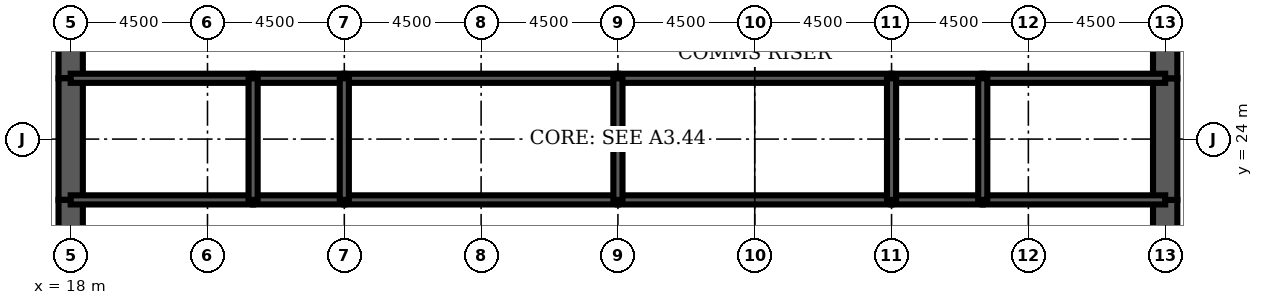
"""IFC4 building model, lengths in metres.
Left out: names, types, materials, properties, quantities, classifications, styles, units other than length and angle.
Written with IfcOpenShell. Run it as: python <this file> out.ifc"""

import sys

from ifc_helpers import new_model, si_unit, direction, frame, frame_2d, origin, place, context, subcontext, project, spatial, rectangle, extrude, element, fill, save


model = new_model("IFC4")
c1 = context("Model", 3, precision=1e-05, world=origin(), true_north=direction((0.0, 1.0)))
c2 = subcontext(c1, "Body", "Model", "MODEL_VIEW")
j1 = project(units=[si_unit("LENGTHUNIT", "METRE"), si_unit("PLANEANGLEUNIT", "RADIAN")], contexts=[c1])
p1 = place(None, origin())
s1 = spatial("IfcSite", under=j1, at=p1, CompositionType="ELEMENT")
p2 = place(p1, origin())
s2 = spatial("IfcBuilding", under=s1, at=p2, CompositionType="ELEMENT")
p3 = place(p2, frame((0.0, 0.0, 190.0)))
s3 = spatial("IfcBuildingStorey", under=s2, at=p3, CompositionType="ELEMENT", Elevation=190.0)
p4 = place(p3, frame((18.0, 28.8, 0.0), z_axis=(0.0, 0.0, 1.0), x_axis=(0.0, -1.0, 0.0)))
e1 = element("IfcWall", 1, at=p4, inside=s3, PredefinedType="SHEAR", context=c2, shape_type="SweptSolid", body=[
    extrude(rectangle(XDim=2.8, YDim=0.8, at=frame_2d((1.4, 0.0))), origin(), (0.0, 0.0, 1.0), 4.2),
])
p5 = place(p4, frame((0.4, 0.0, 0.0)))
e2 = element("IfcOpeningElement", 2, at=p5, cuts=e1, PredefinedType="OPENING", context=c2, shape_type="SweptSolid", body=[
    extrude(rectangle(XDim=1.8, YDim=2.1, at=frame_2d((0.9, 1.05))), frame((0.0, 0.41, 0.0), z_axis=(0.0, -1.0, 0.0), x_axis=(1.0, 0.0, 0.0)), (0.0, 0.0, 1.0), 0.82),
])
p6 = place(p3, frame((18.0, 26.0, 0.0), z_axis=(0.0, 0.0, 1.0), x_axis=(0.0, -1.0, 0.0)))
e3 = element("IfcWall", 3, at=p6, inside=s3, PredefinedType="SHEAR", context=c2, shape_type="SweptSolid", body=[
    extrude(rectangle(XDim=4.0, YDim=0.8, at=frame_2d((2.0, 0.0))), origin(), (0.0, 0.0, 1.0), 4.2),
])
p7 = place(p3, frame((18.0, 22.0, 0.0), z_axis=(0.0, 0.0, 1.0), x_axis=(0.0, -1.0, 0.0)))
e4 = element("IfcWall", 4, at=p7, inside=s3, PredefinedType="SHEAR", context=c2, shape_type="SweptSolid", body=[
    extrude(rectangle(XDim=2.8, YDim=0.8, at=frame_2d((1.4, 0.0))), origin(), (0.0, 0.0, 1.0), 4.2),
])
p8 = place(p7, frame((0.6, 0.0, 0.0)))
e5 = element("IfcOpeningElement", 5, at=p8, cuts=e4, PredefinedType="OPENING", context=c2, shape_type="SweptSolid", body=[
    extrude(rectangle(XDim=1.8, YDim=2.1, at=frame_2d((0.9, 1.05))), frame((0.0, 0.41, 0.0), z_axis=(0.0, -1.0, 0.0), x_axis=(1.0, 0.0, 0.0)), (0.0, 0.0, 1.0), 0.82),
])
p9 = place(p3, frame((54.0, 19.2, 0.0), z_axis=(0.0, 0.0, 1.0), x_axis=(0.0, 1.0, 0.0)))
e6 = element("IfcWall", 6, at=p9, inside=s3, PredefinedType="SHEAR", context=c2, shape_type="SweptSolid", body=[
    extrude(rectangle(XDim=2.8, YDim=0.8, at=frame_2d((1.4, 0.0))), origin(), (0.0, 0.0, 1.0), 4.2),
])
p10 = place(p9, frame((0.4, 0.0, 0.0)))
e7 = element("IfcOpeningElement", 7, at=p10, cuts=e6, PredefinedType="OPENING", context=c2, shape_type="SweptSolid", body=[
    extrude(rectangle(XDim=1.8, YDim=2.1, at=frame_2d((0.9, 1.05))), frame((0.0, 0.41, 0.0), z_axis=(0.0, -1.0, 0.0), x_axis=(1.0, 0.0, 0.0)), (0.0, 0.0, 1.0), 0.82),
])
p11 = place(p3, frame((54.0, 22.0, 0.0), z_axis=(0.0, 0.0, 1.0), x_axis=(0.0, 1.0, 0.0)))
e8 = element("IfcWall", 8, at=p11, inside=s3, PredefinedType="SHEAR", context=c2, shape_type="SweptSolid", body=[
    extrude(rectangle(XDim=4.0, YDim=0.8, at=frame_2d((2.0, 0.0))), origin(), (0.0, 0.0, 1.0), 4.2),
])
p12 = place(p3, frame((54.0, 26.0, 0.0), z_axis=(0.0, 0.0, 1.0), x_axis=(0.0, 1.0, 0.0)))
e9 = element("IfcWall", 9, at=p12, inside=s3, PredefinedType="SHEAR", context=c2, shape_type="SweptSolid", body=[
    extrude(rectangle(XDim=2.8, YDim=0.8, at=frame_2d((1.4, 0.0))), origin(), (0.0, 0.0, 1.0), 4.2),
])
p13 = place(p12, frame((0.6, 0.0, 0.0)))
e10 = element("IfcOpeningElement", 10, at=p13, cuts=e9, PredefinedType="OPENING", context=c2, shape_type="SweptSolid", body=[
    extrude(rectangle(XDim=1.8, YDim=2.1, at=frame_2d((0.9, 1.05))), frame((0.0, 0.41, 0.0), z_axis=(0.0, -1.0, 0.0), x_axis=(1.0, 0.0, 0.0)), (0.0, 0.0, 1.0), 0.82),
])
p14 = place(p3, frame((18.0, 22.0, 0.0), z_axis=(0.0, 0.0, 1.0), x_axis=(1.0, 0.0, 0.0)))
e11 = element("IfcWall", 11, at=p14, inside=s3, PredefinedType="SOLIDWALL", context=c2, shape_type="SweptSolid", body=[
    extrude(rectangle(XDim=6.0, YDim=0.3, at=frame_2d((3.0, 0.0))), origin(), (0.0, 0.0, 1.0), 4.2),
])
p15 = place(p14, frame((4.4, 0.0, 0.0)))
e12 = element("IfcOpeningElement", 12, at=p15, cuts=e11, PredefinedType="OPENING", context=c2, shape_type="SweptSolid", body=[
    extrude(rectangle(XDim=1.0, YDim=2.1, at=frame_2d((0.5, 1.05))), frame((0.0, 0.16, 0.0), z_axis=(0.0, -1.0, 0.0), x_axis=(1.0, 0.0, 0.0)), (0.0, 0.0, 1.0), 0.32),
])
p16 = place(p14, frame((0.8, 0.0, 0.0)))
e13 = element("IfcOpeningElement", 13, at=p16, cuts=e11, PredefinedType="OPENING", context=c2, shape_type="SweptSolid", body=[
    extrude(rectangle(XDim=1.0, YDim=2.1, at=frame_2d((0.5, 1.05))), frame((0.0, 0.16, 0.0), z_axis=(0.0, -1.0, 0.0), x_axis=(1.0, 0.0, 0.0)), (0.0, 0.0, 1.0), 0.32),
])
p17 = place(p3, frame((24.0, 22.0, 0.0), z_axis=(0.0, 0.0, 1.0), x_axis=(1.0, 0.0, 0.0)))
e14 = element("IfcWall", 14, at=p17, inside=s3, PredefinedType="SOLIDWALL", context=c2, shape_type="SweptSolid", body=[
    extrude(rectangle(XDim=3.0, YDim=0.3, at=frame_2d((1.5, 0.0))), origin(), (0.0, 0.0, 1.0), 4.2),
])
p18 = place(p17, frame((1.0, 0.0, 0.0)))
e15 = element("IfcOpeningElement", 15, at=p18, cuts=e14, PredefinedType="OPENING", context=c2, shape_type="SweptSolid", body=[
    extrude(rectangle(XDim=1.0, YDim=2.1, at=frame_2d((0.5, 1.05))), frame((0.0, 0.16, 0.0), z_axis=(0.0, -1.0, 0.0), x_axis=(1.0, 0.0, 0.0)), (0.0, 0.0, 1.0), 0.32),
])
p19 = place(p3, frame((27.0, 22.0, 0.0), z_axis=(0.0, 0.0, 1.0), x_axis=(1.0, 0.0, 0.0)))
e16 = element("IfcWall", 16, at=p19, inside=s3, PredefinedType="SOLIDWALL", context=c2, shape_type="SweptSolid", body=[
    extrude(rectangle(XDim=9.0, YDim=0.3, at=frame_2d((4.5, 0.0))), origin(), (0.0, 0.0, 1.0), 4.2),
])
p20 = place(p19, frame((4.0, 0.0, 0.0)))
e17 = element("IfcOpeningElement", 17, at=p20, cuts=e16, PredefinedType="OPENING", context=c2, shape_type="SweptSolid", body=[
    extrude(rectangle(XDim=1.0, YDim=2.1, at=frame_2d((0.5, 1.05))), frame((0.0, 0.16, 0.0), z_axis=(0.0, -1.0, 0.0), x_axis=(1.0, 0.0, 0.0)), (0.0, 0.0, 1.0), 0.32),
])
p21 = place(p3, frame((36.0, 22.0, 0.0), z_axis=(0.0, 0.0, 1.0), x_axis=(1.0, 0.0, 0.0)))
e18 = element("IfcWall", 18, at=p21, inside=s3, PredefinedType="SOLIDWALL", context=c2, shape_type="SweptSolid", body=[
    extrude(rectangle(XDim=9.0, YDim=0.3, at=frame_2d((4.5, 0.0))), origin(), (0.0, 0.0, 1.0), 4.2),
])
p22 = place(p21, frame((4.0, 0.0, 0.0)))
e19 = element("IfcOpeningElement", 19, at=p22, cuts=e18, PredefinedType="OPENING", context=c2, shape_type="SweptSolid", body=[
    extrude(rectangle(XDim=1.0, YDim=2.1, at=frame_2d((0.5, 1.05))), frame((0.0, 0.16, 0.0), z_axis=(0.0, -1.0, 0.0), x_axis=(1.0, 0.0, 0.0)), (0.0, 0.0, 1.0), 0.32),
])
p23 = place(p3, frame((45.0, 22.0, 0.0), z_axis=(0.0, 0.0, 1.0), x_axis=(1.0, 0.0, 0.0)))
e20 = element("IfcWall", 20, at=p23, inside=s3, PredefinedType="SOLIDWALL", context=c2, shape_type="SweptSolid", body=[
    extrude(rectangle(XDim=3.0, YDim=0.3, at=frame_2d((1.5, 0.0))), origin(), (0.0, 0.0, 1.0), 4.2),
])
p24 = place(p23, frame((1.0, 0.0, 0.0)))
e21 = element("IfcOpeningElement", 21, at=p24, cuts=e20, PredefinedType="OPENING", context=c2, shape_type="SweptSolid", body=[
    extrude(rectangle(XDim=1.0, YDim=2.1, at=frame_2d((0.5, 1.05))), frame((0.0, 0.16, 0.0), z_axis=(0.0, -1.0, 0.0), x_axis=(1.0, 0.0, 0.0)), (0.0, 0.0, 1.0), 0.32),
])
p25 = place(p3, frame((48.0, 22.0, 0.0), z_axis=(0.0, 0.0, 1.0), x_axis=(1.0, 0.0, 0.0)))
e22 = element("IfcWall", 22, at=p25, inside=s3, PredefinedType="SOLIDWALL", context=c2, shape_type="SweptSolid", body=[
    extrude(rectangle(XDim=6.0, YDim=0.3, at=frame_2d((3.0, 0.0))), origin(), (0.0, 0.0, 1.0), 4.2),
])
p26 = place(p25, frame((2.0, 0.0, 0.0)))
e23 = element("IfcOpeningElement", 23, at=p26, cuts=e22, PredefinedType="OPENING", context=c2, shape_type="SweptSolid", body=[
    extrude(rectangle(XDim=1.0, YDim=2.1, at=frame_2d((0.5, 1.05))), frame((0.0, 0.16, 0.0), z_axis=(0.0, -1.0, 0.0), x_axis=(1.0, 0.0, 0.0)), (0.0, 0.0, 1.0), 0.32),
])
p27 = place(p25, frame((4.2, 0.0, 0.0)))
e24 = element("IfcOpeningElement", 24, at=p27, cuts=e22, PredefinedType="OPENING", context=c2, shape_type="SweptSolid", body=[
    extrude(rectangle(XDim=1.0, YDim=2.1, at=frame_2d((0.5, 1.05))), frame((0.0, 0.16, 0.0), z_axis=(0.0, -1.0, 0.0), x_axis=(1.0, 0.0, 0.0)), (0.0, 0.0, 1.0), 0.32),
])
p28 = place(p3, frame((18.0, 26.0, 0.0), z_axis=(0.0, 0.0, 1.0), x_axis=(1.0, 0.0, 0.0)))
e25 = element("IfcWall", 25, at=p28, inside=s3, PredefinedType="SOLIDWALL", context=c2, shape_type="SweptSolid", body=[
    extrude(rectangle(XDim=6.0, YDim=0.3, at=frame_2d((3.0, 0.0))), origin(), (0.0, 0.0, 1.0), 4.2),
])
p29 = place(p3, frame((24.0, 26.0, 0.0), z_axis=(0.0, 0.0, 1.0), x_axis=(1.0, 0.0, 0.0)))
e26 = element("IfcWall", 26, at=p29, inside=s3, PredefinedType="SOLIDWALL", context=c2, shape_type="SweptSolid", body=[
    extrude(rectangle(XDim=3.0, YDim=0.3, at=frame_2d((1.5, 0.0))), origin(), (0.0, 0.0, 1.0), 4.2),
])
for number, where, z_axis, x_axis in (
    (27, (27.0, 26.0, 0.0), (0.0, 0.0, 1.0), (1.0, 0.0, 0.0)),
    (28, (36.0, 26.0, 0.0), (0.0, 0.0, 1.0), (1.0, 0.0, 0.0)),
):
    element("IfcWall", number, at=place(p3, frame(where, z_axis=z_axis, x_axis=x_axis)), inside=s3, PredefinedType="SOLIDWALL", context=c2, shape_type="SweptSolid", body=[
        extrude(rectangle(XDim=9.0, YDim=0.3, at=frame_2d((4.5, 0.0))), origin(), (0.0, 0.0, 1.0), 4.2),
    ])
p30 = place(p3, frame((45.0, 26.0, 0.0), z_axis=(0.0, 0.0, 1.0), x_axis=(1.0, 0.0, 0.0)))
e29 = element("IfcWall", 29, at=p30, inside=s3, PredefinedType="SOLIDWALL", context=c2, shape_type="SweptSolid", body=[
    extrude(rectangle(XDim=3.0, YDim=0.3, at=frame_2d((1.5, 0.0))), origin(), (0.0, 0.0, 1.0), 4.2),
])
p31 = place(p3, frame((48.0, 26.0, 0.0), z_axis=(0.0, 0.0, 1.0), x_axis=(1.0, 0.0, 0.0)))
e30 = element("IfcWall", 30, at=p31, inside=s3, PredefinedType="SOLIDWALL", context=c2, shape_type="SweptSolid", body=[
    extrude(rectangle(XDim=6.0, YDim=0.3, at=frame_2d((3.0, 0.0))), origin(), (0.0, 0.0, 1.0), 4.2),
])
for number, where, z_axis, x_axis in (
    (31, (24.0, 22.0, 0.0), (0.0, 0.0, 1.0), (0.0, 1.0, 0.0)),
    (32, (27.0, 22.0, 0.0), (0.0, 0.0, 1.0), (0.0, 1.0, 0.0)),
    (33, (36.0, 22.0, 0.0), (0.0, 0.0, 1.0), (0.0, 1.0, 0.0)),
    (34, (45.0, 22.0, 0.0), (0.0, 0.0, 1.0), (0.0, 1.0, 0.0)),
    (35, (48.0, 22.0, 0.0), (0.0, 0.0, 1.0), (0.0, 1.0, 0.0)),
):
    element("IfcWall", number, at=place(p3, frame(where, z_axis=z_axis, x_axis=x_axis)), inside=s3, PredefinedType="SOLIDWALL", context=c2, shape_type="SweptSolid", body=[
        extrude(rectangle(XDim=4.0, YDim=0.3, at=frame_2d((2.0, 0.0))), origin(), (0.0, 0.0, 1.0), 4.2),
    ])
p32 = place(p3, frame((39.0, 22.15, 0.0), z_axis=(0.0, 0.0, 1.0), x_axis=(0.0, 1.0, 0.0)))
e36 = element("IfcWall", 36, at=p32, inside=s3, PredefinedType="PARTITIONING", context=c2, shape_type="SweptSolid", body=[
    extrude(rectangle(XDim=3.7, YDim=0.15, at=frame_2d((1.85, 0.0))), origin(), (0.0, 0.0, 1.0), 3.0),
])
p33 = place(p32, frame((2.2, 0.0, 0.0)))
e37 = element("IfcOpeningElement", 37, at=p33, cuts=e36, PredefinedType="OPENING", context=c2, shape_type="SweptSolid", body=[
    extrude(rectangle(XDim=1.0, YDim=2.1, at=frame_2d((0.5, 1.05))), frame((0.0, 0.085, 0.0), z_axis=(0.0, -1.0, 0.0), x_axis=(1.0, 0.0, 0.0)), (0.0, 0.0, 1.0), 0.17),
])
for number, where, z_axis, x_axis in (
    (38, (20.275, 22.15, 0.0), (0.0, 0.0, 1.0), (0.0, 1.0, 0.0)),
    (39, (51.725, 22.15, 0.0), (0.0, 0.0, 1.0), (0.0, 1.0, 0.0)),
):
    element("IfcWall", number, at=place(p3, frame(where, z_axis=z_axis, x_axis=x_axis)), inside=s3, PredefinedType="PARTITIONING", context=c2, shape_type="SweptSolid", body=[
        extrude(rectangle(XDim=3.7, YDim=0.15, at=frame_2d((1.85, 0.0))), origin(), (0.0, 0.0, 1.0), 3.0),
    ])
p34 = place(p33, origin())
e40 = element("IfcDoor", 40, at=p34, inside=s3, OperationType="SINGLE_SWING_RIGHT", PredefinedType="DOOR", context=c2, shape_type="SweptSolid", body=[
    extrude(rectangle(XDim=1.0, YDim=2.1, at=frame_2d((0.5, 1.05))), frame((0.0, 0.025, 0.0), z_axis=(0.0, -1.0, 0.0), x_axis=(1.0, 0.0, 0.0)), (0.0, 0.0, 1.0), 0.05),
])
fill(e37, e40)
p35 = place(p8, origin())
e41 = element("IfcDoor", 41, at=p35, inside=s3, OperationType="SINGLE_SWING_LEFT", PredefinedType="DOOR", context=c2, shape_type="SweptSolid", body=[
    extrude(rectangle(XDim=1.8, YDim=2.1, at=frame_2d((0.9, 1.05))), frame((0.0, 0.4, 0.0), z_axis=(0.0, -1.0, 0.0), x_axis=(1.0, 0.0, 0.0)), (0.0, 0.0, 1.0), 0.8),
])
fill(e5, e41)
p36 = place(p5, origin())
e42 = element("IfcDoor", 42, at=p36, inside=s3, OperationType="SINGLE_SWING_LEFT", PredefinedType="DOOR", context=c2, shape_type="SweptSolid", body=[
    extrude(rectangle(XDim=1.8, YDim=2.1, at=frame_2d((0.9, 1.05))), frame((0.0, 0.4, 0.0), z_axis=(0.0, -1.0, 0.0), x_axis=(1.0, 0.0, 0.0)), (0.0, 0.0, 1.0), 0.8),
])
fill(e2, e42)
p37 = place(p10, origin())
e43 = element("IfcDoor", 43, at=p37, inside=s3, OperationType="SINGLE_SWING_LEFT", PredefinedType="DOOR", context=c2, shape_type="SweptSolid", body=[
    extrude(rectangle(XDim=1.8, YDim=2.1, at=frame_2d((0.9, 1.05))), frame((0.0, 0.4, 0.0), z_axis=(0.0, -1.0, 0.0), x_axis=(1.0, 0.0, 0.0)), (0.0, 0.0, 1.0), 0.8),
])
fill(e7, e43)
p38 = place(p13, origin())
e44 = element("IfcDoor", 44, at=p38, inside=s3, OperationType="SINGLE_SWING_LEFT", PredefinedType="DOOR", context=c2, shape_type="SweptSolid", body=[
    extrude(rectangle(XDim=1.8, YDim=2.1, at=frame_2d((0.9, 1.05))), frame((0.0, 0.4, 0.0), z_axis=(0.0, -1.0, 0.0), x_axis=(1.0, 0.0, 0.0)), (0.0, 0.0, 1.0), 0.8),
])
fill(e10, e44)
p39 = place(p15, origin())
e45 = element("IfcDoor", 45, at=p39, inside=s3, OperationType="SINGLE_SWING_RIGHT", PredefinedType="DOOR", context=c2, shape_type="SweptSolid", body=[
    extrude(rectangle(XDim=1.0, YDim=2.1, at=frame_2d((0.5, 1.05))), frame((0.0, 0.025, 0.0), z_axis=(0.0, -1.0, 0.0), x_axis=(1.0, 0.0, 0.0)), (0.0, 0.0, 1.0), 0.05),
])
fill(e12, e45)
p40 = place(p18, origin())
e46 = element("IfcDoor", 46, at=p40, inside=s3, OperationType="SINGLE_SWING_LEFT", PredefinedType="DOOR", context=c2, shape_type="SweptSolid", body=[
    extrude(rectangle(XDim=1.0, YDim=2.1, at=frame_2d((0.5, 1.05))), frame((0.0, 0.025, 0.0), z_axis=(0.0, -1.0, 0.0), x_axis=(1.0, 0.0, 0.0)), (0.0, 0.0, 1.0), 0.05),
])
fill(e15, e46)
p41 = place(p20, origin())
e47 = element("IfcDoor", 47, at=p41, inside=s3, OperationType="SINGLE_SWING_LEFT", PredefinedType="DOOR", context=c2, shape_type="SweptSolid", body=[
    extrude(rectangle(XDim=1.0, YDim=2.1, at=frame_2d((0.5, 1.05))), frame((0.0, 0.025, 0.0), z_axis=(0.0, -1.0, 0.0), x_axis=(1.0, 0.0, 0.0)), (0.0, 0.0, 1.0), 0.05),
])
fill(e17, e47)
p42 = place(p22, origin())
e48 = element("IfcDoor", 48, at=p42, inside=s3, OperationType="SINGLE_SWING_LEFT", PredefinedType="DOOR", context=c2, shape_type="SweptSolid", body=[
    extrude(rectangle(XDim=1.0, YDim=2.1, at=frame_2d((0.5, 1.05))), frame((0.0, 0.025, 0.0), z_axis=(0.0, -1.0, 0.0), x_axis=(1.0, 0.0, 0.0)), (0.0, 0.0, 1.0), 0.05),
])
fill(e19, e48)
p43 = place(p24, origin())
e49 = element("IfcDoor", 49, at=p43, inside=s3, OperationType="SINGLE_SWING_LEFT", PredefinedType="DOOR", context=c2, shape_type="SweptSolid", body=[
    extrude(rectangle(XDim=1.0, YDim=2.1, at=frame_2d((0.5, 1.05))), frame((0.0, 0.025, 0.0), z_axis=(0.0, -1.0, 0.0), x_axis=(1.0, 0.0, 0.0)), (0.0, 0.0, 1.0), 0.05),
])
fill(e21, e49)
p44 = place(p26, origin())
e50 = element("IfcDoor", 50, at=p44, inside=s3, OperationType="SINGLE_SWING_LEFT", PredefinedType="DOOR", context=c2, shape_type="SweptSolid", body=[
    extrude(rectangle(XDim=1.0, YDim=2.1, at=frame_2d((0.5, 1.05))), frame((0.0, 0.025, 0.0), z_axis=(0.0, -1.0, 0.0), x_axis=(1.0, 0.0, 0.0)), (0.0, 0.0, 1.0), 0.05),
])
fill(e23, e50)
p45 = place(p16, origin())
e51 = element("IfcDoor", 51, at=p45, inside=s3, OperationType="SINGLE_SWING_LEFT", PredefinedType="DOOR", context=c2, shape_type="SweptSolid", body=[
    extrude(rectangle(XDim=1.0, YDim=2.1, at=frame_2d((0.5, 1.05))), frame((0.0, 0.025, 0.0), z_axis=(0.0, -1.0, 0.0), x_axis=(1.0, 0.0, 0.0)), (0.0, 0.0, 1.0), 0.05),
])
fill(e13, e51)
p46 = place(p27, origin())
e52 = element("IfcDoor", 52, at=p46, inside=s3, OperationType="SINGLE_SWING_RIGHT", PredefinedType="DOOR", context=c2, shape_type="SweptSolid", body=[
    extrude(rectangle(XDim=1.0, YDim=2.1, at=frame_2d((0.5, 1.05))), frame((0.0, 0.025, 0.0), z_axis=(0.0, -1.0, 0.0), x_axis=(1.0, 0.0, 0.0)), (0.0, 0.0, 1.0), 0.05),
])
fill(e24, e52)
save(model, sys.argv[1])
